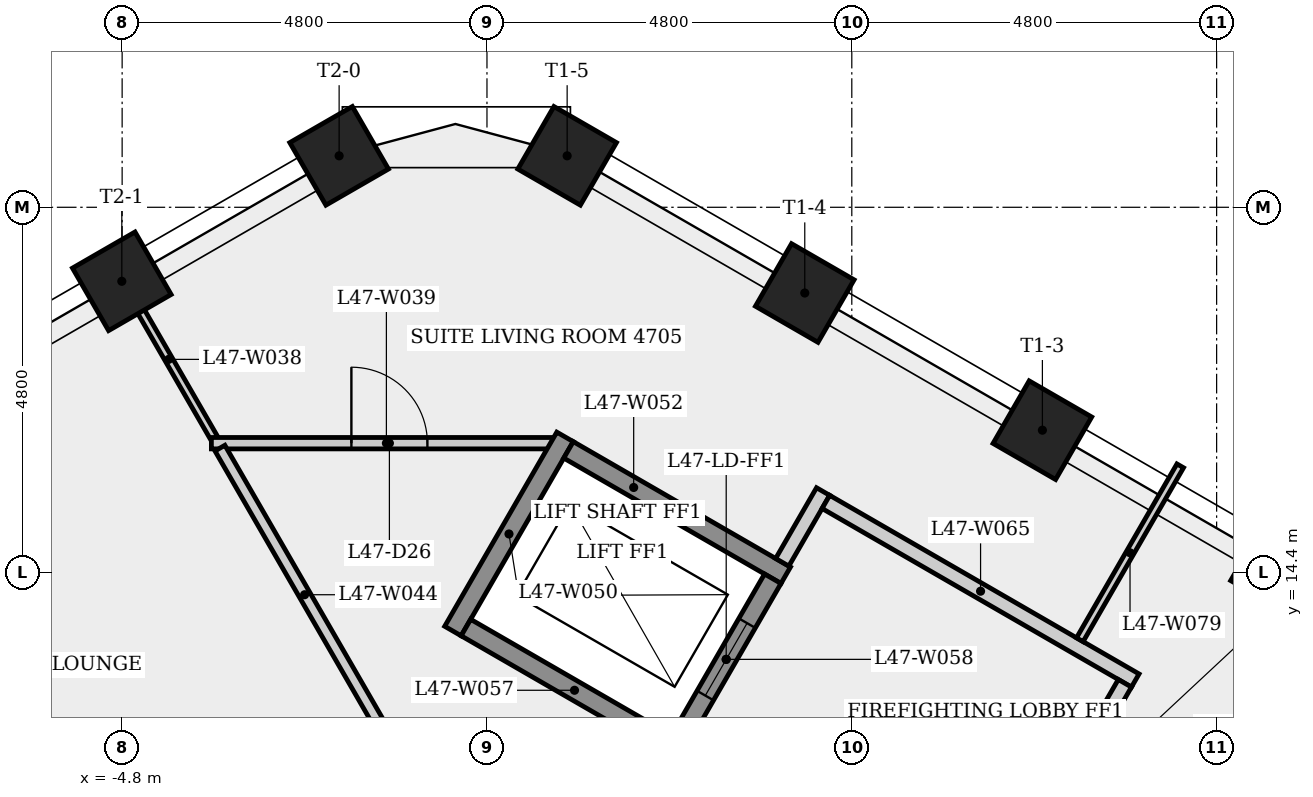
"""IFC4 building model, lengths in metres.
Left out: names, types, materials, properties, quantities, classifications, styles, units other than length and angle.
Written with IfcOpenShell. Run it as: python <this file> out.ifc"""

import sys

from ifc_helpers import new_model, si_unit, direction, frame, frame_2d, origin, origin_2d, place, context, subcontext, project, spatial, rectangle, extrude, element, fill, save


model = new_model("IFC4")
c1 = context("Model", 3, precision=1e-05, world=origin(), true_north=direction((0.0, 1.0)))
c2 = subcontext(c1, "Body", "Model", "MODEL_VIEW")
j1 = project(units=[si_unit("LENGTHUNIT", "METRE"), si_unit("PLANEANGLEUNIT", "RADIAN")], contexts=[c1])
p1 = place(None, origin())
s1 = spatial("IfcSite", under=j1, at=p1, CompositionType="ELEMENT")
p2 = place(p1, origin())
s2 = spatial("IfcBuilding", under=s1, at=p2, CompositionType="ELEMENT")
p3 = place(p2, frame((0.0, 0.0, 176.5)))
s3 = spatial("IfcBuildingStorey", under=s2, at=p3, CompositionType="ELEMENT", Elevation=176.5)
for number, where, z_axis, x_axis in (
    (1, (10.434, 14.462, 0.0), (0.0, 0.0, 1.0), (0.5, 0.866, 0.0)),
    (2, (7.308, 16.267, 0.0), (0.0, 0.0, 1.0), (0.5, 0.866, 0.0)),
    (3, (4.181, 18.072, 0.0), (0.0, 0.0, 1.0), (0.5, 0.866, 0.0)),
    (4, (1.055, 19.877, 0.0), (0.0, 0.0, 1.0), (0.5, 0.866, 0.0)),
    (5, (-1.945, 19.877, 0.0), (0.0, 0.0, 1.0), (-0.5, 0.866, 0.0)),
    (6, (-4.804, 18.226, 0.0), (0.0, 0.0, 1.0), (-0.5, 0.866, 0.0)),
):
    element("IfcColumn", number, at=place(p3, frame(where, z_axis=z_axis, x_axis=x_axis)), inside=s3, PredefinedType="COLUMN", context=c2, shape_type="SweptSolid", body=[
        extrude(rectangle(XDim=0.95, YDim=0.95, at=origin_2d()), origin(), (0.0, 0.0, 1.0), 3.4),
    ])
p4 = place(p3, frame((-3.588, 16.161, 0.0), z_axis=(0.0, 0.0, 1.0), x_axis=(-0.499951716245, 0.866053278629, 0.0)))
e7 = element("IfcWall", 7, at=p4, inside=s3, PredefinedType="PARTITIONING", context=c2, shape_type="SweptSolid", body=[
    extrude(rectangle(XDim=2.397, YDim=0.1, at=frame_2d((1.198, 0.0))), origin(), (0.0, 0.0, 1.0), 3.05),
])
p5 = place(p3, frame((-3.626, 16.096, 0.0), z_axis=(0.0, 0.0, 1.0), x_axis=(1.0, 0.0, 0.0)))
e8 = element("IfcWall", 8, at=p5, inside=s3, PredefinedType="PARTITIONING", context=c2, shape_type="SweptSolid", body=[
    extrude(rectangle(XDim=4.605, YDim=0.15, at=frame_2d((2.302, 0.0))), origin(), (0.0, 0.0, 1.0), 3.05),
])
p6 = place(p5, frame((1.842, 0.0, 0.0)))
e9 = element("IfcOpeningElement", 9, at=p6, cuts=e8, PredefinedType="OPENING", context=c2, shape_type="SweptSolid", body=[
    extrude(rectangle(XDim=1.0, YDim=2.1, at=frame_2d((0.5, 1.05))), frame((0.0, 0.085, 0.0), z_axis=(0.0, -1.0, 0.0), x_axis=(1.0, 0.0, 0.0)), (0.0, 0.0, 1.0), 0.17),
])
p7 = place(p3, frame((-1.286, 12.173, 0.0), z_axis=(0.0, 0.0, 1.0), x_axis=(-0.499988122821, 0.866032260968, 0.0)))
e10 = element("IfcWall", 10, at=p7, inside=s3, PredefinedType="PARTITIONING", context=c2, shape_type="SweptSolid", body=[
    extrude(rectangle(XDim=4.455, YDim=0.15, at=frame_2d((2.227, 0.0))), origin(), (0.0, 0.0, 1.0), 3.05),
])
p8 = place(p3, frame((-0.448, 13.624, 0.0), z_axis=(0.0, 0.0, 1.0), x_axis=(0.500037662692, 0.866003658127, 0.0)))
e11 = element("IfcWall", 11, at=p8, inside=s3, PredefinedType="SHEAR", context=c2, shape_type="SweptSolid", body=[
    extrude(rectangle(XDim=2.95, YDim=0.25, at=frame_2d((1.475, 0.0))), origin(), (0.0, 0.0, 1.0), 3.05),
])
for number, where, z_axis, x_axis in (
    (12, (1.073, 16.008, 0.0), (0.0, 0.0, 1.0), (0.866, -0.5, 0.0)),
    (13, (2.581, 12.02, 0.0), (0.0, 0.0, 1.0), (-0.866, 0.5, 0.0)),
):
    element("IfcWall", number, at=place(p3, frame(where, z_axis=z_axis, x_axis=x_axis)), inside=s3, PredefinedType="SHEAR", context=c2, shape_type="SweptSolid", body=[
        extrude(rectangle(XDim=3.3, YDim=0.25, at=frame_2d((1.65, 0.0))), origin(), (0.0, 0.0, 1.0), 3.05),
    ])
p9 = place(p3, frame((2.535, 12.191, 0.0), z_axis=(0.0, 0.0, 1.0), x_axis=(0.500061746146, 0.865989751695, 0.0)))
e14 = element("IfcWall", 14, at=p9, inside=s3, PredefinedType="SHEAR", context=c2, shape_type="SweptSolid", body=[
    extrude(rectangle(XDim=2.45, YDim=0.25, at=frame_2d((1.225, 0.0))), origin(), (0.0, 0.0, 1.0), 3.4),
])
p10 = place(p9, frame((0.675, 0.0, 0.0)))
e15 = element("IfcOpeningElement", 15, at=p10, cuts=e14, PredefinedType="OPENING", context=c2, shape_type="SweptSolid", body=[
    extrude(rectangle(XDim=1.1, YDim=2.1, at=frame_2d((0.55, 1.05))), frame((0.0, 0.135, 0.0), z_axis=(0.0, -1.0, 0.0), x_axis=(1.0, 0.0, 0.0)), (0.0, 0.0, 1.0), 0.27),
])
p11 = place(p3, frame((3.885, 14.529, 0.0), z_axis=(0.0, 0.0, 1.0), x_axis=(0.499997628298, 0.866026773083, 0.0)))
e16 = element("IfcWall", 16, at=p11, inside=s3, PredefinedType="PARTITIONING", context=c2, shape_type="SweptSolid", body=[
    extrude(rectangle(XDim=1.075, YDim=0.2, at=frame_2d((0.538, 0.0))), origin(), (0.0, 0.0, 1.0), 3.05),
])
p12 = place(p3, frame((4.459, 15.323, 0.0), z_axis=(0.0, 0.0, 1.0), x_axis=(0.866016039709, -0.500016218704, 0.0)))
e17 = element("IfcWall", 17, at=p12, inside=s3, PredefinedType="PARTITIONING", context=c2, shape_type="SweptSolid", body=[
    extrude(rectangle(XDim=4.7, YDim=0.2, at=frame_2d((2.35, 0.0))), origin(), (0.0, 0.0, 1.0), 3.05),
])
p13 = place(p3, frame((6.48, 9.624, 0.0), z_axis=(0.0, 0.0, 1.0), x_axis=(0.500017246033, 0.866015446554, 0.0)))
e18 = element("IfcWall", 18, at=p13, inside=s3, PredefinedType="SHEAR", context=c2, shape_type="SweptSolid", body=[
    extrude(rectangle(XDim=3.25, YDim=0.25, at=frame_2d((1.625, 0.0))), origin(), (0.0, 0.0, 1.0), 3.05),
])
p14 = place(p13, frame((1.125, 0.0, 0.0)))
e19 = element("IfcOpeningElement", 19, at=p14, cuts=e18, PredefinedType="OPENING", context=c2, shape_type="SweptSolid", body=[
    extrude(rectangle(XDim=1.0, YDim=2.1, at=frame_2d((0.5, 1.05))), frame((0.0, 0.135, 0.0), z_axis=(0.0, -1.0, 0.0), x_axis=(1.0, 0.0, 0.0)), (0.0, 0.0, 1.0), 0.27),
])
p15 = place(p3, frame((7.8, 13.51, 0.0), z_axis=(0.0, 0.0, 1.0), x_axis=(0.50000507839, 0.866022471755, 0.0)))
e20 = element("IfcWall", 20, at=p15, inside=s3, PredefinedType="PARTITIONING", context=c2, shape_type="SweptSolid", body=[
    extrude(rectangle(XDim=2.642, YDim=0.1, at=frame_2d((1.321, 0.0))), origin(), (0.0, 0.0, 1.0), 3.05),
])
p16 = place(p3, frame((8.393, 12.937, 0.0), z_axis=(0.0, 0.0, 1.0), x_axis=(-0.500065409566, -0.86598763626, 0.0)))
e21 = element("IfcWall", 21, at=p16, inside=s3, PredefinedType="PARTITIONING", context=c2, shape_type="SweptSolid", body=[
    extrude(rectangle(XDim=0.575, YDim=0.2, at=frame_2d((0.288, 0.0))), origin(), (0.0, 0.0, 1.0), 3.05),
])
p17 = place(p10, origin())
e22 = element("IfcDoor", 22, at=p17, inside=s3, OperationType="SLIDING_TO_LEFT", PredefinedType="DOOR", context=c2, shape_type="SweptSolid", body=[
    extrude(rectangle(XDim=1.1, YDim=2.1, at=frame_2d((0.55, 1.05))), frame((0.0, 0.025, 0.0), z_axis=(0.0, -1.0, 0.0), x_axis=(1.0, 0.0, 0.0)), (0.0, 0.0, 1.0), 0.05),
])
fill(e15, e22)
p18 = place(p6, origin())
e23 = element("IfcDoor", 23, at=p18, inside=s3, OperationType="SINGLE_SWING_LEFT", PredefinedType="DOOR", context=c2, shape_type="SweptSolid", body=[
    extrude(rectangle(XDim=1.0, YDim=2.1, at=frame_2d((0.5, 1.05))), frame((0.0, 0.025, 0.0), z_axis=(0.0, -1.0, 0.0), x_axis=(1.0, 0.0, 0.0)), (0.0, 0.0, 1.0), 0.05),
])
fill(e9, e23)
save(model, sys.argv[1])
